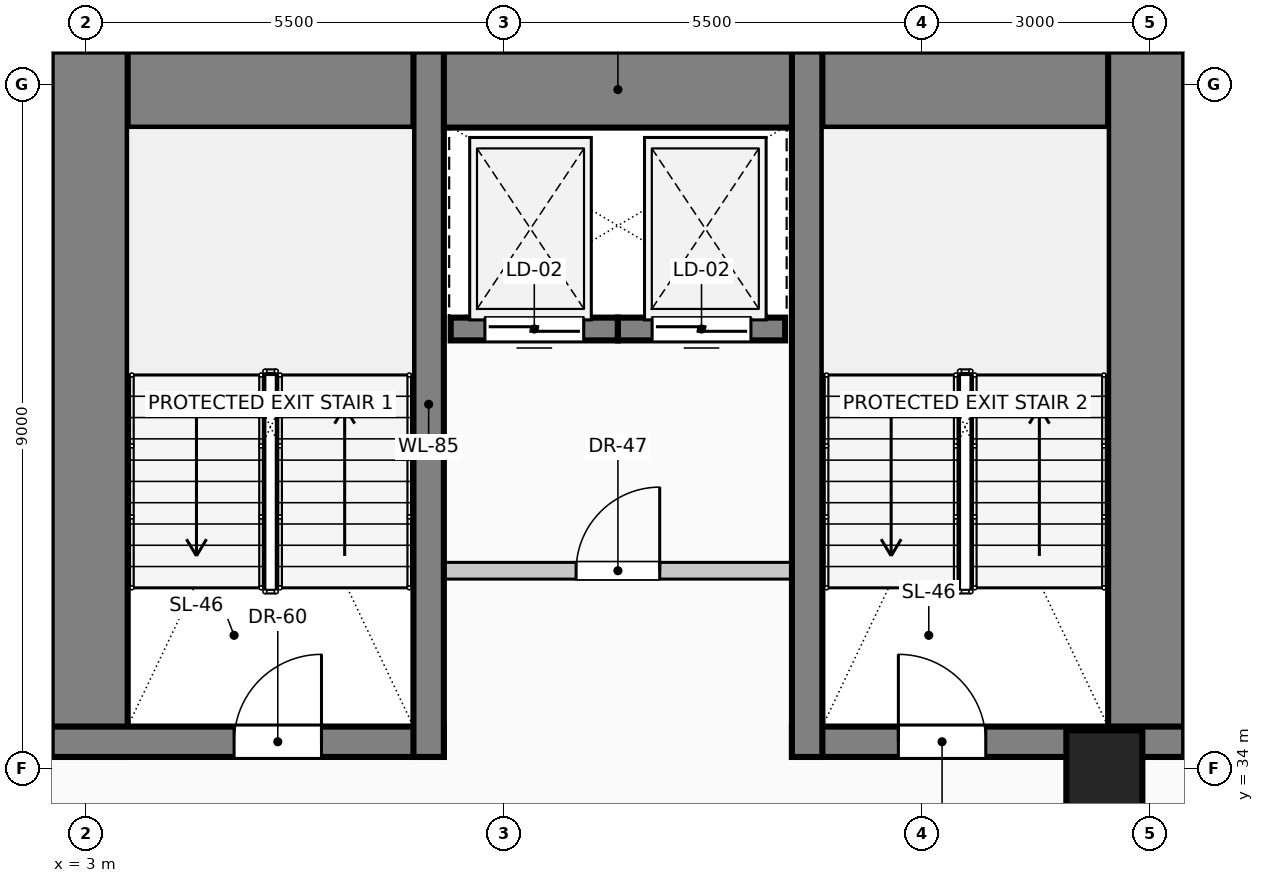
"""IFC4 building model, lengths in metres.
Left out: names, types, materials, properties, quantities, classifications, styles, units other than length and angle.
Written with IfcOpenShell. Run it as: python <this file> out.ifc"""

import sys

from ifc_helpers import new_model, si_unit, direction, frame, frame_2d, origin, origin_2d, place, context, subcontext, project, spatial, rectangle, circle, extrude, element, fill, save


model = new_model("IFC4")
c1 = context("Model", 3, precision=1e-05, world=origin(), true_north=direction((0.0, 1.0)))
c2 = subcontext(c1, "Body", "Model", "MODEL_VIEW")
j1 = project(units=[si_unit("LENGTHUNIT", "METRE"), si_unit("PLANEANGLEUNIT", "RADIAN")], contexts=[c1])
p1 = place(None, origin())
s1 = spatial("IfcSite", under=j1, at=p1, CompositionType="ELEMENT")
p2 = place(p1, origin())
s2 = spatial("IfcBuilding", under=s1, at=p2, CompositionType="ELEMENT")
p3 = place(p2, frame((0.0, 0.0, 70.6)))
s3 = spatial("IfcBuildingStorey", under=s2, at=p3, CompositionType="ELEMENT", Elevation=70.6)
p4 = place(p3, frame((2.55, 42.93, 0.0), z_axis=(0.0, 0.0, 1.0), x_axis=(1.0, 0.0, 0.0)))
e1 = element("IfcWall", 1, at=p4, inside=s3, PredefinedType="SHEAR", context=c2, shape_type="SweptSolid", body=[
    extrude(rectangle(XDim=14.9, YDim=1.0, at=frame_2d((7.45, 0.0))), origin(), (0.0, 0.0, 1.0), 4.0),
])
for number, where, z_axis, x_axis in (
    (2, (3.05, 34.15, 0.0), (0.0, 0.0, 1.0), (0.0, 1.0, 0.0)),
    (3, (16.95, 34.15, 0.0), (0.0, 0.0, 1.0), (0.0, 1.0, 0.0)),
):
    element("IfcWall", number, at=place(p3, frame(where, z_axis=z_axis, x_axis=x_axis)), inside=s3, PredefinedType="SHEAR", context=c2, shape_type="SweptSolid", body=[
        extrude(rectangle(XDim=9.28, YDim=1.0, at=frame_2d((4.64, 0.0))), origin(), (0.0, 0.0, 1.0), 4.0),
    ])
p5 = place(p3, frame((2.55, 34.35, 0.0), z_axis=(0.0, 0.0, 1.0), x_axis=(1.0, 0.0, 0.0)))
e4 = element("IfcWall", 4, at=p5, inside=s3, PredefinedType="SHEAR", context=c2, shape_type="SweptSolid", body=[
    extrude(rectangle(XDim=5.16, YDim=0.4, at=frame_2d((2.58, 0.0))), origin(), (0.0, 0.0, 1.0), 4.0),
])
p6 = place(p5, frame((2.4, 0.0, 0.0)))
e5 = element("IfcOpeningElement", 5, at=p6, cuts=e4, PredefinedType="OPENING", context=c2, shape_type="SweptSolid", body=[
    extrude(rectangle(XDim=1.15, YDim=2.2, at=frame_2d((0.575, 1.1))), frame((0.0, 0.21, 0.0), z_axis=(0.0, -1.0, 0.0), x_axis=(1.0, 0.0, 0.0)), (0.0, 0.0, 1.0), 0.42),
])
p7 = place(p3, frame((12.29, 34.35, 0.0), z_axis=(0.0, 0.0, 1.0), x_axis=(1.0, 0.0, 0.0)))
e6 = element("IfcWall", 6, at=p7, inside=s3, PredefinedType="SHEAR", context=c2, shape_type="SweptSolid", body=[
    extrude(rectangle(XDim=5.16, YDim=0.4, at=frame_2d((2.58, 0.0))), origin(), (0.0, 0.0, 1.0), 4.0),
])
p8 = place(p7, frame((1.4, 0.0, 0.0)))
e7 = element("IfcOpeningElement", 7, at=p8, cuts=e6, PredefinedType="OPENING", context=c2, shape_type="SweptSolid", body=[
    extrude(rectangle(XDim=1.15, YDim=2.2, at=frame_2d((0.575, 1.1))), frame((0.0, 0.21, 0.0), z_axis=(0.0, -1.0, 0.0), x_axis=(1.0, 0.0, 0.0)), (0.0, 0.0, 1.0), 0.42),
])
for number, where, z_axis, x_axis in (
    (8, (7.51, 34.15, 0.0), (0.0, 0.0, 1.0), (0.0, 1.0, 0.0)),
    (9, (12.49, 34.15, 0.0), (0.0, 0.0, 1.0), (0.0, 1.0, 0.0)),
):
    element("IfcWall", number, at=place(p3, frame(where, z_axis=z_axis, x_axis=x_axis)), inside=s3, PredefinedType="SHEAR", context=c2, shape_type="SweptSolid", body=[
        extrude(rectangle(XDim=9.28, YDim=0.4, at=frame_2d((4.64, 0.0))), origin(), (0.0, 0.0, 1.0), 4.0),
    ])
p9 = place(p3, frame((16.4, 34.0, 0.0), z_axis=(0.0, 0.0, 1.0), x_axis=(1.0, 0.0, 0.0)))
e10 = element("IfcColumn", 10, at=p9, inside=s3, PredefinedType="COLUMN", context=c2, shape_type="SweptSolid", body=[
    extrude(circle(Radius=0.5, at=origin_2d()), origin(), (0.0, 0.0, 1.0), 4.0),
])
p10 = place(p3, frame((10.0, 39.78, 0.0), z_axis=(0.0, 0.0, 1.0), x_axis=(-1.0, 0.0, 0.0)))
e11 = element("IfcWall", 11, at=p10, inside=s3, PredefinedType="SOLIDWALL", context=c2, shape_type="SweptSolid", body=[
    extrude(rectangle(XDim=2.2, YDim=0.3, at=frame_2d((1.1, 0.0))), origin(), (0.0, 0.0, 1.0), 4.0),
])
p11 = place(p10, frame((0.45, 0.0, 0.0)))
e12 = element("IfcOpeningElement", 12, at=p11, cuts=e11, PredefinedType="OPENING", context=c2, shape_type="SweptSolid", body=[
    extrude(rectangle(XDim=1.3, YDim=2.25, at=frame_2d((0.65, 1.125))), frame((0.0, 0.16, 0.0), z_axis=(0.0, -1.0, 0.0), x_axis=(1.0, 0.0, 0.0)), (0.0, 0.0, 1.0), 0.32),
])
p12 = place(p3, frame((12.2, 39.78, 0.0), z_axis=(0.0, 0.0, 1.0), x_axis=(-1.0, 0.0, 0.0)))
e13 = element("IfcWall", 13, at=p12, inside=s3, PredefinedType="SOLIDWALL", context=c2, shape_type="SweptSolid", body=[
    extrude(rectangle(XDim=2.2, YDim=0.3, at=frame_2d((1.1, 0.0))), origin(), (0.0, 0.0, 1.0), 4.0),
])
p13 = place(p12, frame((0.45, 0.0, 0.0)))
e14 = element("IfcOpeningElement", 14, at=p13, cuts=e13, PredefinedType="OPENING", context=c2, shape_type="SweptSolid", body=[
    extrude(rectangle(XDim=1.3, YDim=2.25, at=frame_2d((0.65, 1.125))), frame((0.0, 0.16, 0.0), z_axis=(0.0, -1.0, 0.0), x_axis=(1.0, 0.0, 0.0)), (0.0, 0.0, 1.0), 0.32),
])
p14 = place(p3, frame((7.51, 36.6, 0.0), z_axis=(0.0, 0.0, 1.0), x_axis=(1.0, 0.0, 0.0)))
e15 = element("IfcWall", 15, at=p14, inside=s3, PredefinedType="PARTITIONING", context=c2, shape_type="SweptSolid", body=[
    extrude(rectangle(XDim=4.98, YDim=0.22, at=frame_2d((2.49, 0.0))), origin(), (0.0, 0.0, 1.0), 3.7),
])
p15 = place(p14, frame((1.94, 0.0, 0.0)))
e16 = element("IfcOpeningElement", 16, at=p15, cuts=e15, PredefinedType="OPENING", context=c2, shape_type="SweptSolid", body=[
    extrude(rectangle(XDim=1.1, YDim=2.2, at=frame_2d((0.55, 1.1))), frame((0.0, 0.12, 0.0), z_axis=(0.0, -1.0, 0.0), x_axis=(1.0, 0.0, 0.0)), (0.0, 0.0, 1.0), 0.24),
])
p16 = place(p11, origin())
e17 = element("IfcDoor", 17, at=p16, inside=s3, OperationType="SLIDING_TO_LEFT", PredefinedType="DOOR", context=c2, shape_type="SweptSolid", body=[
    extrude(rectangle(XDim=1.3, YDim=2.25, at=frame_2d((0.65, 1.125))), frame((0.0, 0.025, 0.0), z_axis=(0.0, -1.0, 0.0), x_axis=(1.0, 0.0, 0.0)), (0.0, 0.0, 1.0), 0.05),
])
fill(e12, e17)
p17 = place(p13, origin())
e18 = element("IfcDoor", 18, at=p17, inside=s3, OperationType="SLIDING_TO_RIGHT", PredefinedType="DOOR", context=c2, shape_type="SweptSolid", body=[
    extrude(rectangle(XDim=1.3, YDim=2.25, at=frame_2d((0.65, 1.125))), frame((0.0, 0.025, 0.0), z_axis=(0.0, -1.0, 0.0), x_axis=(1.0, 0.0, 0.0)), (0.0, 0.0, 1.0), 0.05),
])
fill(e14, e18)
p18 = place(p6, origin())
e19 = element("IfcDoor", 19, at=p18, inside=s3, OperationType="SINGLE_SWING_RIGHT", PredefinedType="DOOR", context=c2, shape_type="SweptSolid", body=[
    extrude(rectangle(XDim=1.15, YDim=2.2, at=frame_2d((0.575, 1.1))), frame((0.0, 0.025, 0.0), z_axis=(0.0, -1.0, 0.0), x_axis=(1.0, 0.0, 0.0)), (0.0, 0.0, 1.0), 0.05),
])
fill(e5, e19)
p19 = place(p8, origin())
e20 = element("IfcDoor", 20, at=p19, inside=s3, OperationType="SINGLE_SWING_LEFT", PredefinedType="DOOR", context=c2, shape_type="SweptSolid", body=[
    extrude(rectangle(XDim=1.15, YDim=2.2, at=frame_2d((0.575, 1.1))), frame((0.0, 0.025, 0.0), z_axis=(0.0, -1.0, 0.0), x_axis=(1.0, 0.0, 0.0)), (0.0, 0.0, 1.0), 0.05),
])
fill(e7, e20)
p20 = place(p15, origin())
e21 = element("IfcDoor", 21, at=p20, inside=s3, OperationType="SINGLE_SWING_RIGHT", PredefinedType="DOOR", context=c2, shape_type="SweptSolid", body=[
    extrude(rectangle(XDim=1.1, YDim=2.2, at=frame_2d((0.55, 1.1))), frame((0.0, 0.025, 0.0), z_axis=(0.0, -1.0, 0.0), x_axis=(1.0, 0.0, 0.0)), (0.0, 0.0, 1.0), 0.05),
])
fill(e16, e21)
save(model, sys.argv[1])
